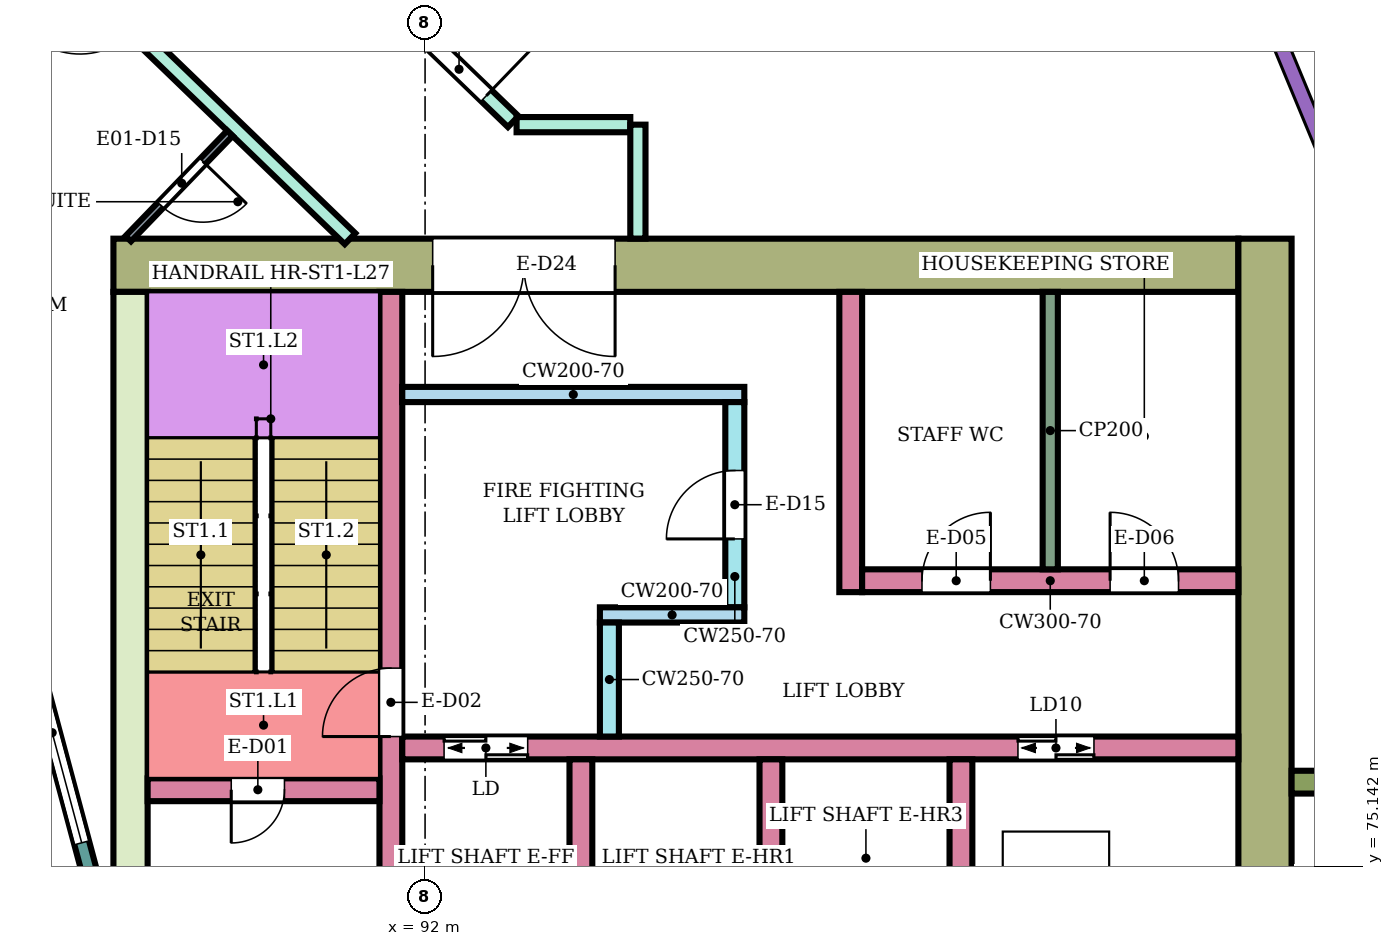
"""IFC4 building model, lengths in metres.
Left out: names, types, materials, properties, quantities, classifications, styles, units other than length and angle.
Written with IfcOpenShell. Run it as: python <this file> out.ifc"""

import sys

from ifc_helpers import new_model, si_unit, direction, frame, frame_2d, origin, place, context, subcontext, project, spatial, rectangle, extrude, element, fill, save


model = new_model("IFC4")
c1 = context("Model", 3, precision=1e-05, world=origin(), true_north=direction((0.0, 1.0)))
c2 = subcontext(c1, "Body", "Model", "MODEL_VIEW")
j1 = project(units=[si_unit("LENGTHUNIT", "METRE"), si_unit("PLANEANGLEUNIT", "RADIAN")], contexts=[c1])
p1 = place(None, origin())
s1 = spatial("IfcSite", under=j1, at=p1, CompositionType="ELEMENT")
p2 = place(p1, origin())
s2 = spatial("IfcBuilding", under=s1, at=p2, CompositionType="ELEMENT")
p3 = place(p2, frame((0.0, 0.0, 118.5)))
s3 = spatial("IfcBuildingStorey", under=s2, at=p3, CompositionType="ELEMENT", Elevation=118.5)
p4 = place(p3, frame((87.9, 83.05, 0.0), z_axis=(0.0, 0.0, 1.0), x_axis=(1.0, 0.0, 0.0)))
e1 = element("IfcWall", 1, at=p4, inside=s3, PredefinedType="SHEAR", context=c2, shape_type="SweptSolid", body=[
    extrude(rectangle(XDim=14.8, YDim=0.7, at=frame_2d((7.4, 0.0))), origin(), (0.0, 0.0, 1.0), 3.58),
])
p5 = place(p4, frame((4.2, 0.0, 0.0)))
e2 = element("IfcOpeningElement", 2, at=p5, cuts=e1, PredefinedType="OPENING", context=c2, shape_type="SweptSolid", body=[
    extrude(rectangle(XDim=2.4, YDim=2.4, at=frame_2d((1.2, 1.2))), frame((0.0, 0.36, 0.0), z_axis=(0.0, -1.0, 0.0), x_axis=(1.0, 0.0, 0.0)), (0.0, 0.0, 1.0), 0.72),
])
p6 = place(p3, frame((88.125, 75.0, 0.0), z_axis=(0.0, 0.0, 1.0), x_axis=(0.0, 1.0, 0.0)))
e3 = element("IfcWall", 3, at=p6, inside=s3, PredefinedType="SHEAR", context=c2, shape_type="SweptSolid", body=[
    extrude(rectangle(XDim=7.7, YDim=0.45, at=frame_2d((3.85, 0.0))), origin(), (0.0, 0.0, 1.0), 3.58),
])
p7 = place(p3, frame((103.05, 66.6, 0.0), z_axis=(0.0, 0.0, 1.0), x_axis=(0.0, 1.0, 0.0)))
e4 = element("IfcWall", 4, at=p7, inside=s3, PredefinedType="SHEAR", context=c2, shape_type="SweptSolid", body=[
    extrude(rectangle(XDim=16.8, YDim=0.7, at=frame_2d((8.4, 0.0))), origin(), (0.0, 0.0, 1.0), 3.58),
])
p8 = place(p3, frame((91.55, 75.0, 0.0), z_axis=(0.0, 0.0, 1.0), x_axis=(0.0, 1.0, 0.0)))
e5 = element("IfcWall", 5, at=p8, inside=s3, PredefinedType="SHEAR", context=c2, shape_type="SweptSolid", body=[
    extrude(rectangle(XDim=7.7, YDim=0.3, at=frame_2d((3.85, 0.0))), origin(), (0.0, 0.0, 1.0), 3.58),
])
p9 = place(p8, frame((1.85, 0.0, 0.0)))
e6 = element("IfcOpeningElement", 6, at=p9, cuts=e5, PredefinedType="OPENING", context=c2, shape_type="SweptSolid", body=[
    extrude(rectangle(XDim=0.9, YDim=2.1, at=frame_2d((0.45, 1.05))), frame((0.0, 0.16, 0.0), z_axis=(0.0, -1.0, 0.0), x_axis=(1.0, 0.0, 0.0)), (0.0, 0.0, 1.0), 0.32),
])
p10 = place(p3, frame((88.35, 76.15, 0.0), z_axis=(0.0, 0.0, 1.0), x_axis=(1.0, 0.0, 0.0)))
e7 = element("IfcWall", 7, at=p10, inside=s3, PredefinedType="SHEAR", context=c2, shape_type="SweptSolid", body=[
    extrude(rectangle(XDim=3.05, YDim=0.3, at=frame_2d((1.525, 0.0))), origin(), (0.0, 0.0, 1.0), 3.58),
])
p11 = place(p10, frame((1.1, 0.0, 0.0)))
e8 = element("IfcOpeningElement", 8, at=p11, cuts=e7, PredefinedType="OPENING", context=c2, shape_type="SweptSolid", body=[
    extrude(rectangle(XDim=0.7, YDim=2.0, at=frame_2d((0.35, 1.0))), frame((0.0, 0.16, 0.0), z_axis=(0.0, -1.0, 0.0), x_axis=(1.0, 0.0, 0.0)), (0.0, 0.0, 1.0), 0.32),
])
p12 = place(p3, frame((91.7, 76.7, 0.0), z_axis=(0.0, 0.0, 1.0), x_axis=(1.0, 0.0, 0.0)))
e9 = element("IfcWall", 9, at=p12, inside=s3, PredefinedType="SHEAR", context=c2, shape_type="SweptSolid", body=[
    extrude(rectangle(XDim=11.0, YDim=0.3, at=frame_2d((5.5, 0.0))), origin(), (0.0, 0.0, 1.0), 3.58),
])
p13 = place(p12, frame((0.55, 0.0, 0.0)))
e10 = element("IfcOpeningElement", 10, at=p13, cuts=e9, PredefinedType="OPENING", context=c2, shape_type="SweptSolid", body=[
    extrude(rectangle(XDim=1.1, YDim=2.1, at=frame_2d((0.55, 1.05))), frame((0.0, 0.16, 0.0), z_axis=(0.0, -1.0, 0.0), x_axis=(1.0, 0.0, 0.0)), (0.0, 0.0, 1.0), 0.32),
])
p14 = place(p12, frame((8.1, 0.0, 0.0)))
e11 = element("IfcOpeningElement", 11, at=p14, cuts=e9, PredefinedType="OPENING", context=c2, shape_type="SweptSolid", body=[
    extrude(rectangle(XDim=1.0, YDim=2.1, at=frame_2d((0.5, 1.05))), frame((0.0, 0.16, 0.0), z_axis=(0.0, -1.0, 0.0), x_axis=(1.0, 0.0, 0.0)), (0.0, 0.0, 1.0), 0.32),
])
for number, where, z_axis, x_axis in (
    (12, (94.05, 74.0, 0.0), (0.0, 0.0, 1.0), (0.0, 1.0, 0.0)),
    (13, (96.55, 74.0, 0.0), (0.0, 0.0, 1.0), (0.0, 1.0, 0.0)),
    (14, (99.05, 74.0, 0.0), (0.0, 0.0, 1.0), (0.0, 1.0, 0.0)),
):
    element("IfcWall", number, at=place(p3, frame(where, z_axis=z_axis, x_axis=x_axis)), inside=s3, PredefinedType="SHEAR", context=c2, shape_type="SweptSolid", body=[
        extrude(rectangle(XDim=2.55, YDim=0.3, at=frame_2d((1.275, 0.0))), origin(), (0.0, 0.0, 1.0), 3.58),
    ])
p15 = place(p3, frame((91.7, 81.35, 0.0), z_axis=(0.0, 0.0, 1.0), x_axis=(1.0, 0.0, 0.0)))
e15 = element("IfcWall", 15, at=p15, inside=s3, PredefinedType="SHEAR", context=c2, shape_type="SweptSolid", body=[
    extrude(rectangle(XDim=4.5, YDim=0.2, at=frame_2d((2.25, 0.0))), origin(), (0.0, 0.0, 1.0), 3.58),
])
p16 = place(p3, frame((96.075, 78.55, 0.0), z_axis=(0.0, 0.0, 1.0), x_axis=(0.0, 1.0, 0.0)))
e16 = element("IfcWall", 16, at=p16, inside=s3, PredefinedType="SHEAR", context=c2, shape_type="SweptSolid", body=[
    extrude(rectangle(XDim=2.7, YDim=0.25, at=frame_2d((1.35, 0.0))), origin(), (0.0, 0.0, 1.0), 3.58),
])
p17 = place(p16, frame((0.9, 0.0, 0.0)))
e17 = element("IfcOpeningElement", 17, at=p17, cuts=e16, PredefinedType="OPENING", context=c2, shape_type="SweptSolid", body=[
    extrude(rectangle(XDim=0.9, YDim=2.1, at=frame_2d((0.45, 1.05))), frame((0.0, 0.135, 0.0), z_axis=(0.0, -1.0, 0.0), x_axis=(1.0, 0.0, 0.0)), (0.0, 0.0, 1.0), 0.27),
])
p18 = place(p3, frame((94.3, 78.45, 0.0), z_axis=(0.0, 0.0, 1.0), x_axis=(1.0, 0.0, 0.0)))
e18 = element("IfcWall", 18, at=p18, inside=s3, PredefinedType="SHEAR", context=c2, shape_type="SweptSolid", body=[
    extrude(rectangle(XDim=1.9, YDim=0.2, at=frame_2d((0.95, 0.0))), origin(), (0.0, 0.0, 1.0), 3.58),
])
p19 = place(p3, frame((94.425, 76.85, 0.0), z_axis=(0.0, 0.0, 1.0), x_axis=(0.0, 1.0, 0.0)))
e19 = element("IfcWall", 19, at=p19, inside=s3, PredefinedType="SHEAR", context=c2, shape_type="SweptSolid", body=[
    extrude(rectangle(XDim=1.5, YDim=0.25, at=frame_2d((0.75, 0.0))), origin(), (0.0, 0.0, 1.0), 3.58),
])
p20 = place(p3, frame((97.6, 78.75, 0.0), z_axis=(0.0, 0.0, 1.0), x_axis=(0.0, 1.0, 0.0)))
e20 = element("IfcWall", 20, at=p20, inside=s3, PredefinedType="SHEAR", context=c2, shape_type="SweptSolid", body=[
    extrude(rectangle(XDim=3.95, YDim=0.3, at=frame_2d((1.975, 0.0))), origin(), (0.0, 0.0, 1.0), 3.58),
])
p21 = place(p3, frame((97.75, 78.9, 0.0), z_axis=(0.0, 0.0, 1.0), x_axis=(1.0, 0.0, 0.0)))
e21 = element("IfcWall", 21, at=p21, inside=s3, PredefinedType="SHEAR", context=c2, shape_type="SweptSolid", body=[
    extrude(rectangle(XDim=4.95, YDim=0.3, at=frame_2d((2.475, 0.0))), origin(), (0.0, 0.0, 1.0), 3.58),
])
p22 = place(p21, frame((0.788, 0.0, 0.0)))
e22 = element("IfcOpeningElement", 22, at=p22, cuts=e21, PredefinedType="OPENING", context=c2, shape_type="SweptSolid", body=[
    extrude(rectangle(XDim=0.9, YDim=2.1, at=frame_2d((0.45, 1.05))), frame((0.0, 0.16, 0.0), z_axis=(0.0, -1.0, 0.0), x_axis=(1.0, 0.0, 0.0)), (0.0, 0.0, 1.0), 0.32),
])
p23 = place(p21, frame((3.262, 0.0, 0.0)))
e23 = element("IfcOpeningElement", 23, at=p23, cuts=e21, PredefinedType="OPENING", context=c2, shape_type="SweptSolid", body=[
    extrude(rectangle(XDim=0.9, YDim=2.1, at=frame_2d((0.45, 1.05))), frame((0.0, 0.16, 0.0), z_axis=(0.0, -1.0, 0.0), x_axis=(1.0, 0.0, 0.0)), (0.0, 0.0, 1.0), 0.32),
])
p24 = place(p3, frame((103.4, 76.25, 0.0), z_axis=(0.0, 0.0, 1.0), x_axis=(1.0, 0.0, 0.0)))
e24 = element("IfcWall", 24, at=p24, inside=s3, PredefinedType="NOTDEFINED", context=c2, shape_type="SweptSolid", body=[
    extrude(rectangle(XDim=2.416, YDim=0.3, at=frame_2d((1.208, 0.0))), origin(), (0.0, 0.0, 1.0), 3.9),
])
p25 = place(p3, frame((87.604, 75.0, 0.0), z_axis=(0.0, 0.0, 1.0), x_axis=(-0.258789828301, 0.965933654434, 0.0)))
e25 = element("IfcWall", 25, at=p25, inside=s3, PredefinedType="NOTDEFINED", context=c2, shape_type="SweptSolid", body=[
    extrude(rectangle(XDim=3.936, YDim=0.2, at=frame_2d((1.968, 0.0))), origin(), (0.0, 0.0, 1.0), 3.9),
])
p26 = place(p25, frame((0.468, 0.0, 0.9)))
e26 = element("IfcOpeningElement", 26, at=p26, cuts=e25, PredefinedType="OPENING", context=c2, shape_type="SweptSolid", body=[
    extrude(rectangle(XDim=3.0, YDim=2.3, at=frame_2d((1.5, 1.15))), frame((0.0, 0.11, 0.0), z_axis=(0.0, -1.0, 0.0), x_axis=(1.0, 0.0, 0.0)), (0.0, 0.0, 1.0), 0.22),
])
p27 = place(p3, frame((87.064, 87.211, 0.0), z_axis=(0.0, 0.0, 1.0), x_axis=(0.719540958932, -0.694450004262, 0.0)))
e27 = element("IfcWall", 27, at=p27, inside=s3, PredefinedType="PARTITIONING", context=c2, shape_type="SweptSolid", body=[
    extrude(rectangle(XDim=5.488, YDim=0.2, at=frame_2d((2.744, 0.0))), origin(), (0.0, 0.0, 1.0), 3.45),
])
p28 = place(p27, frame((0.55, 0.0, 0.0)))
e28 = element("IfcOpeningElement", 28, at=p28, cuts=e27, PredefinedType="OPENING", context=c2, shape_type="SweptSolid", body=[
    extrude(rectangle(XDim=1.0, YDim=2.1, at=frame_2d((0.5, 1.05))), frame((0.0, 0.11, 0.0), z_axis=(0.0, -1.0, 0.0), x_axis=(1.0, 0.0, 0.0)), (0.0, 0.0, 1.0), 0.22),
])
p29 = place(p3, frame((88.466, 89.473, 0.0), z_axis=(0.0, 0.0, 1.0), x_axis=(0.719346014649, -0.694651935295, 0.0)))
e29 = element("IfcWall", 29, at=p29, inside=s3, PredefinedType="PARTITIONING", context=c2, shape_type="SweptSolid", body=[
    extrude(rectangle(XDim=6.525, YDim=0.2, at=frame_2d((3.263, 0.0))), origin(), (0.0, 0.0, 1.0), 3.45),
])
p30 = place(p29, frame((5.034, 0.0, 0.0)))
e30 = element("IfcOpeningElement", 30, at=p30, cuts=e29, PredefinedType="OPENING", context=c2, shape_type="SweptSolid", body=[
    extrude(rectangle(XDim=1.0, YDim=2.1, at=frame_2d((0.5, 1.05))), frame((0.0, 0.11, 0.0), z_axis=(0.0, -1.0, 0.0), x_axis=(1.0, 0.0, 0.0)), (0.0, 0.0, 1.0), 0.22),
])
p31 = place(p3, frame((93.204, 84.9, 0.0), z_axis=(0.0, 0.0, 1.0), x_axis=(1.0, 0.0, 0.0)))
e31 = element("IfcWall", 31, at=p31, inside=s3, PredefinedType="PARTITIONING", context=c2, shape_type="SweptSolid", body=[
    extrude(rectangle(XDim=1.496, YDim=0.2, at=frame_2d((0.748, 0.0))), origin(), (0.0, 0.0, 1.0), 3.45),
])
p32 = place(p3, frame((94.8, 83.401, 0.0), z_axis=(0.0, 0.0, 1.0), x_axis=(0.0, 1.0, 0.0)))
e32 = element("IfcWall", 32, at=p32, inside=s3, PredefinedType="PARTITIONING", context=c2, shape_type="SweptSolid", body=[
    extrude(rectangle(XDim=1.499, YDim=0.2, at=frame_2d((0.75, 0.0))), origin(), (0.0, 0.0, 1.0), 3.45),
])
p33 = place(p3, frame((88.095, 83.4, 0.0), z_axis=(0.0, 0.0, 1.0), x_axis=(0.694447472534, 0.719543402368, 0.0)))
e33 = element("IfcWall", 33, at=p33, inside=s3, PredefinedType="PARTITIONING", context=c2, shape_type="SweptSolid", body=[
    extrude(rectangle(XDim=1.926, YDim=0.1, at=frame_2d((0.963, 0.0))), origin(), (0.0, 0.0, 1.0), 3.45),
])
p34 = place(p33, frame((0.613, 0.0, 0.0)))
e34 = element("IfcOpeningElement", 34, at=p34, cuts=e33, PredefinedType="OPENING", context=c2, shape_type="SweptSolid", body=[
    extrude(rectangle(XDim=0.8, YDim=2.1, at=frame_2d((0.4, 1.05))), frame((0.0, 0.06, 0.0), z_axis=(0.0, -1.0, 0.0), x_axis=(1.0, 0.0, 0.0)), (0.0, 0.0, 1.0), 0.12),
])
p35 = place(p3, frame((100.225, 79.05, 0.0), z_axis=(0.0, 0.0, 1.0), x_axis=(0.0, 1.0, 0.0)))
e35 = element("IfcWall", 35, at=p35, inside=s3, PredefinedType="PARTITIONING", context=c2, shape_type="SweptSolid", body=[
    extrude(rectangle(XDim=3.65, YDim=0.2, at=frame_2d((1.825, 0.0))), origin(), (0.0, 0.0, 1.0), 3.58),
])
p36 = place(p26, origin())
e36 = element("IfcWindow", 36, at=p36, inside=s3, PartitioningType="SINGLE_PANEL", PredefinedType="WINDOW", context=c2, shape_type="SweptSolid", body=[
    extrude(rectangle(XDim=3.0, YDim=2.3, at=frame_2d((1.5, 1.15))), frame((0.0, 0.03, 0.0), z_axis=(0.0, -1.0, 0.0), x_axis=(1.0, 0.0, 0.0)), (0.0, 0.0, 1.0), 0.06),
])
fill(e26, e36)
p37 = place(p30, origin())
e37 = element("IfcDoor", 37, at=p37, inside=s3, OperationType="SINGLE_SWING_RIGHT", PredefinedType="DOOR", context=c2, shape_type="SweptSolid", body=[
    extrude(rectangle(XDim=1.0, YDim=2.1, at=frame_2d((0.5, 1.05))), frame((0.0, 0.025, 0.0), z_axis=(0.0, -1.0, 0.0), x_axis=(1.0, 0.0, 0.0)), (0.0, 0.0, 1.0), 0.05),
])
fill(e30, e37)
p38 = place(p34, frame((0.8, 0.0, 0.0), z_axis=(0.0, 0.0, 1.0), x_axis=(-1.0, 0.0, 0.0)))
e38 = element("IfcDoor", 38, at=p38, inside=s3, OperationType="SINGLE_SWING_LEFT", PredefinedType="DOOR", context=c2, shape_type="SweptSolid", body=[
    extrude(rectangle(XDim=0.8, YDim=2.1, at=frame_2d((0.4, 1.05))), frame((0.0, 0.025, 0.0), z_axis=(0.0, -1.0, 0.0), x_axis=(1.0, 0.0, 0.0)), (0.0, 0.0, 1.0), 0.05),
])
fill(e34, e38)
p39 = place(p11, frame((0.7, 0.0, 0.0), z_axis=(0.0, 0.0, 1.0), x_axis=(-1.0, 0.0, 0.0)))
e39 = element("IfcDoor", 39, at=p39, inside=s3, OperationType="SINGLE_SWING_RIGHT", PredefinedType="DOOR", context=c2, shape_type="SweptSolid", body=[
    extrude(rectangle(XDim=0.7, YDim=2.0, at=frame_2d((0.35, 1.0))), frame((0.0, 0.025, 0.0), z_axis=(0.0, -1.0, 0.0), x_axis=(1.0, 0.0, 0.0)), (0.0, 0.0, 1.0), 0.05),
])
fill(e8, e39)
p40 = place(p9, origin())
e40 = element("IfcDoor", 40, at=p40, inside=s3, OperationType="SINGLE_SWING_LEFT", PredefinedType="DOOR", context=c2, shape_type="SweptSolid", body=[
    extrude(rectangle(XDim=0.9, YDim=2.1, at=frame_2d((0.45, 1.05))), frame((0.0, 0.025, 0.0), z_axis=(0.0, -1.0, 0.0), x_axis=(1.0, 0.0, 0.0)), (0.0, 0.0, 1.0), 0.05),
])
fill(e6, e40)
p41 = place(p13, origin())
e41 = element("IfcDoor", 41, at=p41, inside=s3, OperationType="DOUBLE_DOOR_SLIDING", PredefinedType="DOOR", context=c2, shape_type="SweptSolid", body=[
    extrude(rectangle(XDim=1.1, YDim=2.1, at=frame_2d((0.55, 1.05))), frame((0.0, 0.025, 0.0), z_axis=(0.0, -1.0, 0.0), x_axis=(1.0, 0.0, 0.0)), (0.0, 0.0, 1.0), 0.05),
])
fill(e10, e41)
p42 = place(p14, origin())
e42 = element("IfcDoor", 42, at=p42, inside=s3, OperationType="DOUBLE_DOOR_SLIDING", PredefinedType="DOOR", context=c2, shape_type="SweptSolid", body=[
    extrude(rectangle(XDim=1.0, YDim=2.1, at=frame_2d((0.5, 1.05))), frame((0.0, 0.025, 0.0), z_axis=(0.0, -1.0, 0.0), x_axis=(1.0, 0.0, 0.0)), (0.0, 0.0, 1.0), 0.05),
])
fill(e11, e42)
p43 = place(p17, origin())
e43 = element("IfcDoor", 43, at=p43, inside=s3, OperationType="SINGLE_SWING_LEFT", PredefinedType="DOOR", context=c2, shape_type="SweptSolid", body=[
    extrude(rectangle(XDim=0.9, YDim=2.1, at=frame_2d((0.45, 1.05))), frame((0.0, 0.025, 0.0), z_axis=(0.0, -1.0, 0.0), x_axis=(1.0, 0.0, 0.0)), (0.0, 0.0, 1.0), 0.05),
])
fill(e17, e43)
p44 = place(p22, origin())
e44 = element("IfcDoor", 44, at=p44, inside=s3, OperationType="SINGLE_SWING_RIGHT", PredefinedType="DOOR", context=c2, shape_type="SweptSolid", body=[
    extrude(rectangle(XDim=0.9, YDim=2.1, at=frame_2d((0.45, 1.05))), frame((0.0, 0.025, 0.0), z_axis=(0.0, -1.0, 0.0), x_axis=(1.0, 0.0, 0.0)), (0.0, 0.0, 1.0), 0.05),
])
fill(e22, e44)
p45 = place(p23, origin())
e45 = element("IfcDoor", 45, at=p45, inside=s3, OperationType="SINGLE_SWING_LEFT", PredefinedType="DOOR", context=c2, shape_type="SweptSolid", body=[
    extrude(rectangle(XDim=0.9, YDim=2.1, at=frame_2d((0.45, 1.05))), frame((0.0, 0.025, 0.0), z_axis=(0.0, -1.0, 0.0), x_axis=(1.0, 0.0, 0.0)), (0.0, 0.0, 1.0), 0.05),
])
fill(e23, e45)
p46 = place(p5, frame((2.4, 0.0, 0.0), z_axis=(0.0, 0.0, 1.0), x_axis=(-1.0, 0.0, 0.0)))
e46 = element("IfcDoor", 46, at=p46, inside=s3, OperationType="DOUBLE_DOOR_SINGLE_SWING", PredefinedType="DOOR", context=c2, shape_type="SweptSolid", body=[
    extrude(rectangle(XDim=2.4, YDim=2.4, at=frame_2d((1.2, 1.2))), frame((0.0, 0.025, 0.0), z_axis=(0.0, -1.0, 0.0), x_axis=(1.0, 0.0, 0.0)), (0.0, 0.0, 1.0), 0.05),
])
fill(e2, e46)
save(model, sys.argv[1])
